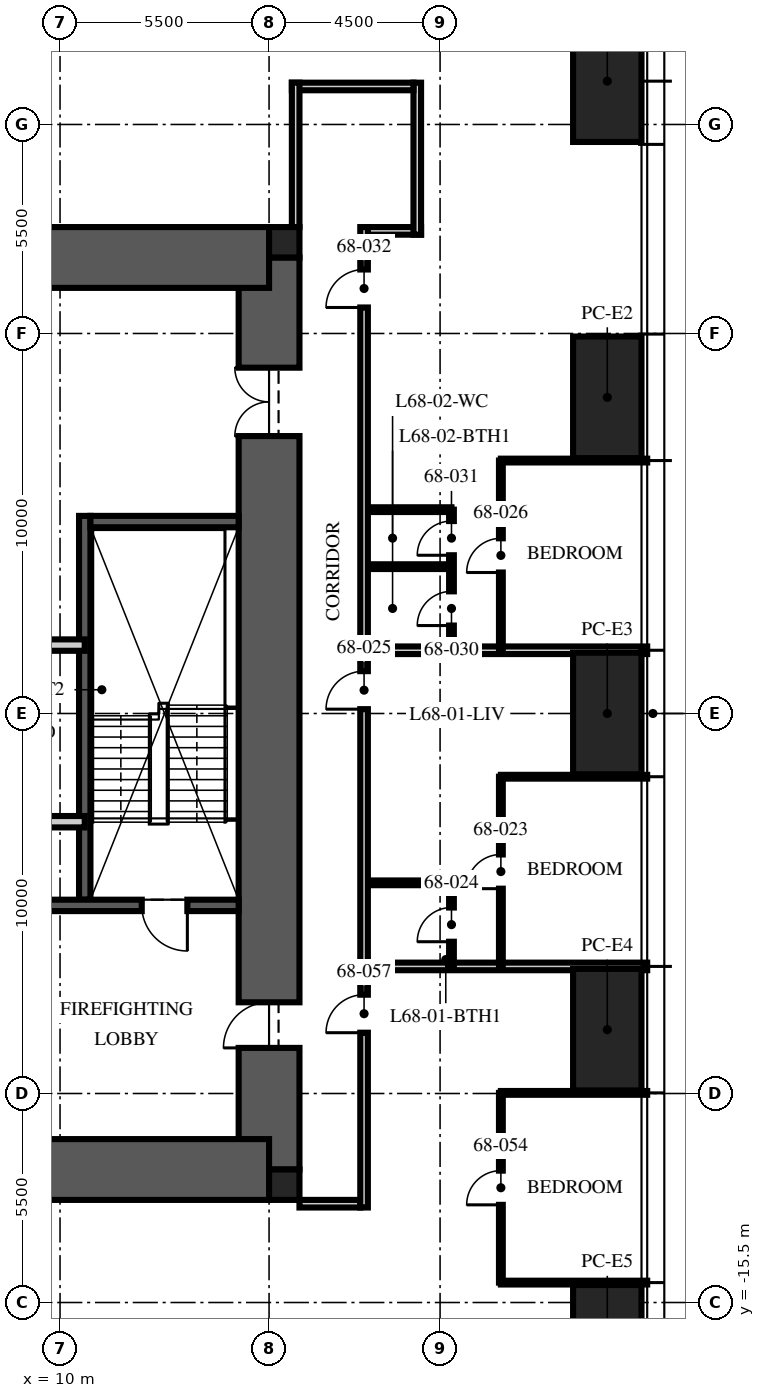
"""IFC4 building model, lengths in metres.
Left out: names, types, materials, properties, quantities, classifications, styles, units other than length and angle.
Written with IfcOpenShell. Run it as: python <this file> out.ifc"""

import sys

from ifc_helpers import new_model, si_unit, direction, frame, frame_2d, origin, origin_2d, place, context, subcontext, project, spatial, rectangle, hollow_rectangle, extrude, element, fill, save


model = new_model("IFC4")
c1 = context("Model", 3, precision=1e-05, world=origin(), true_north=direction((0.0, 1.0)))
c2 = subcontext(c1, "Body", "Model", "MODEL_VIEW")
j1 = project(units=[si_unit("LENGTHUNIT", "METRE"), si_unit("PLANEANGLEUNIT", "RADIAN")], contexts=[c1])
p1 = place(None, origin())
s1 = spatial("IfcSite", under=j1, at=p1, CompositionType="ELEMENT")
p2 = place(p1, origin())
s2 = spatial("IfcBuilding", under=s1, at=p2, CompositionType="ELEMENT")
p3 = place(p2, frame((0.0, 0.0, 270.75)))
s3 = spatial("IfcBuildingStorey", under=s2, at=p3, CompositionType="ELEMENT", Elevation=270.75)
p4 = place(p3, frame((15.5, -12.0, -0.25), z_axis=(0.0, 0.0, 1.0), x_axis=(0.0, 1.0, 0.0)))
e1 = element("IfcWall", 1, at=p4, inside=s3, PredefinedType="SHEAR", context=c2, shape_type="SweptSolid", body=[
    extrude(rectangle(XDim=24.0, YDim=1.6, at=frame_2d((12.0, 0.0))), origin(), (0.0, 0.0, 1.0), 3.75),
])
p5 = place(p4, frame((3.2, 0.0, 0.25)))
e2 = element("IfcOpeningElement", 2, at=p5, cuts=e1, PredefinedType="OPENING", context=c2, shape_type="SweptSolid", body=[
    extrude(rectangle(XDim=1.2, YDim=2.1, at=frame_2d((0.6, 1.05))), frame((0.0, 0.81, 0.0), z_axis=(0.0, -1.0, 0.0), x_axis=(1.0, 0.0, 0.0)), (0.0, 0.0, 1.0), 1.62),
])
p6 = place(p4, frame((19.3, 0.0, 0.25)))
e3 = element("IfcOpeningElement", 3, at=p6, cuts=e1, PredefinedType="OPENING", context=c2, shape_type="SweptSolid", body=[
    extrude(rectangle(XDim=1.8, YDim=2.1, at=frame_2d((0.9, 1.05))), frame((0.0, 0.81, 0.0), z_axis=(0.0, -1.0, 0.0), x_axis=(1.0, 0.0, 0.0)), (0.0, 0.0, 1.0), 1.62),
])
for number, where, z_axis, x_axis in (
    (4, (-15.5, 12.0, -0.25), (0.0, 0.0, 1.0), (1.0, 0.0, 0.0)),
    (5, (-15.5, -12.0, -0.25), (0.0, 0.0, 1.0), (1.0, 0.0, 0.0)),
):
    element("IfcWall", number, at=place(p3, frame(where, z_axis=z_axis, x_axis=x_axis)), inside=s3, PredefinedType="SHEAR", context=c2, shape_type="SweptSolid", body=[
        extrude(rectangle(XDim=31.0, YDim=1.6, at=frame_2d((15.5, 0.0))), origin(), (0.0, 0.0, 1.0), 3.75),
    ])
for number, where, z_axis, x_axis in (
    (6, (15.9, 12.4, -0.25), (0.0, 0.0, 1.0), (1.0, 0.0, 0.0)),
    (7, (15.9, -12.4, -0.25), (0.0, 0.0, 1.0), (1.0, 0.0, 0.0)),
):
    element("IfcColumn", number, at=place(p3, frame(where, z_axis=z_axis, x_axis=x_axis)), inside=s3, PredefinedType="COLUMN", context=c2, shape_type="SweptSolid", body=[
        extrude(rectangle(XDim=0.8, YDim=0.8, at=origin_2d()), origin(), (0.0, 0.0, 1.0), 3.75),
    ])
for number, where, z_axis, x_axis in (
    (8, (24.4, 16.64, 0.0), (0.0, 0.0, 1.0), (0.0, 1.0, 0.0)),
    (9, (24.4, 8.32, 0.0), (0.0, 0.0, 1.0), (0.0, 1.0, 0.0)),
    (10, (24.4, 0.0, 0.0), (0.0, 0.0, 1.0), (0.0, 1.0, 0.0)),
    (11, (24.4, -8.32, 0.0), (0.0, 0.0, 1.0), (0.0, 1.0, 0.0)),
    (12, (24.4, -16.64, 0.0), (0.0, 0.0, 1.0), (0.0, 1.0, 0.0)),
):
    element("IfcColumn", number, at=place(p3, frame(where, z_axis=z_axis, x_axis=x_axis)), inside=s3, PredefinedType="COLUMN", context=c2, shape_type="SweptSolid", body=[
        extrude(hollow_rectangle(XDim=3.2, YDim=1.8, WallThickness=0.14, at=origin_2d()), origin(), (0.0, 0.0, 1.0), 3.75),
    ])
p7 = place(p3, frame((10.65, -4.9, 0.0), z_axis=(0.0, 0.0, 1.0), x_axis=(0.0, 1.0, 0.0)))
e13 = element("IfcWall", 13, at=p7, inside=s3, PredefinedType="SOLIDWALL", context=c2, shape_type="SweptSolid", body=[
    extrude(rectangle(XDim=10.1, YDim=0.3, at=frame_2d((5.05, 0.0))), origin(), (0.0, 0.0, 1.0), 3.5),
])
p8 = place(p3, frame((14.7, -5.05, 0.0), z_axis=(0.0, 0.0, 1.0), x_axis=(-1.0, 0.0, 0.0)))
e14 = element("IfcWall", 14, at=p8, inside=s3, PredefinedType="SOLIDWALL", context=c2, shape_type="SweptSolid", body=[
    extrude(rectangle(XDim=5.9, YDim=0.3, at=frame_2d((2.95, 0.0))), origin(), (0.0, 0.0, 1.0), 3.5),
])
p9 = place(p8, frame((1.35, 0.0, 0.0)))
e15 = element("IfcOpeningElement", 15, at=p9, cuts=e14, PredefinedType="OPENING", context=c2, shape_type="SweptSolid", body=[
    extrude(rectangle(XDim=1.2, YDim=2.1, at=frame_2d((0.6, 1.05))), frame((0.0, 0.16, 0.0), z_axis=(0.0, -1.0, 0.0), x_axis=(1.0, 0.0, 0.0)), (0.0, 0.0, 1.0), 0.32),
])
p10 = place(p3, frame((14.7, 5.05, 0.0), z_axis=(0.0, 0.0, 1.0), x_axis=(-1.0, 0.0, 0.0)))
e16 = element("IfcWall", 16, at=p10, inside=s3, PredefinedType="SOLIDWALL", context=c2, shape_type="SweptSolid", body=[
    extrude(rectangle(XDim=3.9, YDim=0.3, at=frame_2d((1.95, 0.0))), origin(), (0.0, 0.0, 1.0), 3.5),
])
p11 = place(p3, frame((-10.65, 1.8, 0.0), z_axis=(0.0, 0.0, 1.0), x_axis=(1.0, 0.0, 0.0)))
e17 = element("IfcWall", 17, at=p11, inside=s3, PredefinedType="PARTITIONING", context=c2, shape_type="SweptSolid", body=[
    extrude(rectangle(XDim=21.3, YDim=0.3, at=frame_2d((10.65, 0.0))), origin(), (0.0, 0.0, 1.0), 3.5),
])
p12 = place(p11, frame((10.05, 0.0, 0.0)))
e18 = element("IfcOpeningElement", 18, at=p12, cuts=e17, PredefinedType="OPENING", context=c2, shape_type="SweptSolid", body=[
    extrude(rectangle(XDim=1.2, YDim=2.1, at=frame_2d((0.6, 1.05))), frame((0.0, 0.16, 0.0), z_axis=(0.0, -1.0, 0.0), x_axis=(1.0, 0.0, 0.0)), (0.0, 0.0, 1.0), 0.32),
])
p13 = place(p11, frame((19.238, 0.0, 0.0)))
e19 = element("IfcOpeningElement", 19, at=p13, cuts=e17, PredefinedType="OPENING", context=c2, shape_type="SweptSolid", body=[
    extrude(rectangle(XDim=0.9, YDim=2.1, at=frame_2d((0.45, 1.05))), frame((0.0, 0.16, 0.0), z_axis=(0.0, -1.0, 0.0), x_axis=(1.0, 0.0, 0.0)), (0.0, 0.0, 1.0), 0.32),
])
p14 = place(p3, frame((10.65, -2.848, 0.0), z_axis=(0.0, 0.0, 1.0), x_axis=(-1.0, 0.0, 0.0)))
e20 = element("IfcWall", 20, at=p14, inside=s3, PredefinedType="PARTITIONING", context=c2, shape_type="SweptSolid", body=[
    extrude(rectangle(XDim=6.45, YDim=0.3, at=frame_2d((3.225, 0.0))), origin(), (0.0, 0.0, 1.0), 3.5),
])
p15 = place(p3, frame((18.1, 12.7, 0.0), z_axis=(0.0, 0.0, 1.0), x_axis=(1.0, 0.0, 0.0)))
e21 = element("IfcWall", 21, at=p15, inside=s3, PredefinedType="PARTITIONING", context=c2, shape_type="SweptSolid", body=[
    extrude(rectangle(XDim=1.4, YDim=0.2, at=frame_2d((0.7, 0.0))), origin(), (0.0, 0.0, 1.0), 2.71),
])
p16 = place(p3, frame((19.4, 12.6, 0.0), z_axis=(0.0, 0.0, 1.0), x_axis=(0.0, 1.0, 0.0)))
e22 = element("IfcWall", 22, at=p16, inside=s3, PredefinedType="PARTITIONING", context=c2, shape_type="SweptSolid", body=[
    extrude(rectangle(XDim=4.0, YDim=0.2, at=frame_2d((2.0, 0.0))), origin(), (0.0, 0.0, 1.0), 2.6),
])
p17 = place(p3, frame((19.3, 16.5, 0.0), z_axis=(0.0, 0.0, 1.0), x_axis=(-1.0, 0.0, 0.0)))
e23 = element("IfcWall", 23, at=p17, inside=s3, PredefinedType="PARTITIONING", context=c2, shape_type="SweptSolid", body=[
    extrude(rectangle(XDim=3.2, YDim=0.2, at=frame_2d((1.6, 0.0))), origin(), (0.0, 0.0, 1.0), 2.3),
])
p18 = place(p3, frame((16.2, 16.6, 0.0), z_axis=(0.0, 0.0, 1.0), x_axis=(0.0, -1.0, 0.0)))
e24 = element("IfcWall", 24, at=p18, inside=s3, PredefinedType="PARTITIONING", context=c2, shape_type="SweptSolid", body=[
    extrude(rectangle(XDim=3.8, YDim=0.2, at=frame_2d((1.9, 0.0))), origin(), (0.0, 0.0, 1.0), 2.3),
])
p19 = place(p3, frame((16.3, -12.9, 0.0), z_axis=(0.0, 0.0, 1.0), x_axis=(1.0, 0.0, 0.0)))
e25 = element("IfcWall", 25, at=p19, inside=s3, PredefinedType="PARTITIONING", context=c2, shape_type="SweptSolid", body=[
    extrude(rectangle(XDim=1.6, YDim=0.2, at=frame_2d((0.8, 0.0))), origin(), (0.0, 0.0, 1.0), 2.3),
])
p20 = place(p3, frame((18.1, -6.656, 0.0), z_axis=(0.0, 0.0, 1.0), x_axis=(1.0, 0.0, 0.0)))
e26 = element("IfcWall", 26, at=p20, inside=s3, PredefinedType="PARTITIONING", context=c2, shape_type="SweptSolid", body=[
    extrude(rectangle(XDim=7.35, YDim=0.2, at=frame_2d((3.675, 0.0))), origin(), (0.0, 0.0, 1.0), 2.81),
])
p21 = place(p3, frame((21.6, -1.664, 0.0), z_axis=(0.0, 0.0, 1.0), x_axis=(1.0, 0.0, 0.0)))
e27 = element("IfcWall", 27, at=p21, inside=s3, PredefinedType="PARTITIONING", context=c2, shape_type="SweptSolid", body=[
    extrude(rectangle(XDim=3.85, YDim=0.1, at=frame_2d((1.925, 0.0))), origin(), (0.0, 0.0, 1.0), 2.81),
])
p22 = place(p3, frame((18.1, 1.664, 0.0), z_axis=(0.0, 0.0, 1.0), x_axis=(1.0, 0.0, 0.0)))
e28 = element("IfcWall", 28, at=p22, inside=s3, PredefinedType="PARTITIONING", context=c2, shape_type="SweptSolid", body=[
    extrude(rectangle(XDim=7.35, YDim=0.2, at=frame_2d((3.675, 0.0))), origin(), (0.0, 0.0, 1.0), 2.81),
])
for number, where, z_axis, x_axis in (
    (29, (21.6, 6.656, 0.0), (0.0, 0.0, 1.0), (1.0, 0.0, 0.0)),
    (30, (21.6, -14.976, 0.0), (0.0, 0.0, 1.0), (1.0, 0.0, 0.0)),
    (31, (21.6, -9.984, 0.0), (0.0, 0.0, 1.0), (1.0, 0.0, 0.0)),
):
    element("IfcWall", number, at=place(p3, frame(where, z_axis=z_axis, x_axis=x_axis)), inside=s3, PredefinedType="PARTITIONING", context=c2, shape_type="SweptSolid", body=[
        extrude(rectangle(XDim=3.85, YDim=0.1, at=frame_2d((1.925, 0.0))), origin(), (0.0, 0.0, 1.0), 2.81),
    ])
p23 = place(p3, frame((21.6, -6.656, 0.0), z_axis=(0.0, 0.0, 1.0), x_axis=(0.0, 1.0, 0.0)))
e32 = element("IfcWall", 32, at=p23, inside=s3, PredefinedType="PARTITIONING", context=c2, shape_type="SweptSolid", body=[
    extrude(rectangle(XDim=4.992, YDim=0.1, at=frame_2d((2.496, 0.0))), origin(), (0.0, 0.0, 1.0), 2.71),
])
p24 = place(p23, frame((2.046, 0.0, 0.0)))
e33 = element("IfcOpeningElement", 33, at=p24, cuts=e32, PredefinedType="OPENING", context=c2, shape_type="SweptSolid", body=[
    extrude(rectangle(XDim=0.9, YDim=2.1, at=frame_2d((0.45, 1.05))), frame((0.0, 0.06, 0.0), z_axis=(0.0, -1.0, 0.0), x_axis=(1.0, 0.0, 0.0)), (0.0, 0.0, 1.0), 0.12),
])
p25 = place(p3, frame((20.3, -6.656, 0.0), z_axis=(0.0, 0.0, 1.0), x_axis=(0.0, 1.0, 0.0)))
e34 = element("IfcWall", 34, at=p25, inside=s3, PredefinedType="PARTITIONING", context=c2, shape_type="SweptSolid", body=[
    extrude(rectangle(XDim=2.2, YDim=0.125, at=frame_2d((1.1, 0.0))), origin(), (0.0, 0.0, 1.0), 3.5),
])
p26 = place(p25, frame((0.65, 0.0, 0.0)))
e35 = element("IfcOpeningElement", 35, at=p26, cuts=e34, PredefinedType="OPENING", context=c2, shape_type="SweptSolid", body=[
    extrude(rectangle(XDim=0.9, YDim=2.1, at=frame_2d((0.45, 1.05))), frame((0.0, 0.073, 0.0), z_axis=(0.0, -1.0, 0.0), x_axis=(1.0, 0.0, 0.0)), (0.0, 0.0, 1.0), 0.145),
])
p27 = place(p3, frame((18.1, -4.456, 0.0), z_axis=(0.0, 0.0, 1.0), x_axis=(1.0, 0.0, 0.0)))
e36 = element("IfcWall", 36, at=p27, inside=s3, PredefinedType="PARTITIONING", context=c2, shape_type="SweptSolid", body=[
    extrude(rectangle(XDim=2.2, YDim=0.125, at=frame_2d((1.1, 0.0))), origin(), (0.0, 0.0, 1.0), 3.5),
])
p28 = place(p3, frame((21.6, 1.664, 0.0), z_axis=(0.0, 0.0, 1.0), x_axis=(0.0, 1.0, 0.0)))
e37 = element("IfcWall", 37, at=p28, inside=s3, PredefinedType="PARTITIONING", context=c2, shape_type="SweptSolid", body=[
    extrude(rectangle(XDim=4.992, YDim=0.1, at=frame_2d((2.496, 0.0))), origin(), (0.0, 0.0, 1.0), 2.71),
])
p29 = place(p28, frame((2.046, 0.0, 0.0)))
e38 = element("IfcOpeningElement", 38, at=p29, cuts=e37, PredefinedType="OPENING", context=c2, shape_type="SweptSolid", body=[
    extrude(rectangle(XDim=0.9, YDim=2.1, at=frame_2d((0.45, 1.05))), frame((0.0, 0.06, 0.0), z_axis=(0.0, -1.0, 0.0), x_axis=(1.0, 0.0, 0.0)), (0.0, 0.0, 1.0), 0.12),
])
p30 = place(p3, frame((20.3, 1.664, 0.0), z_axis=(0.0, 0.0, 1.0), x_axis=(0.0, 1.0, 0.0)))
e39 = element("IfcWall", 39, at=p30, inside=s3, PredefinedType="PARTITIONING", context=c2, shape_type="SweptSolid", body=[
    extrude(rectangle(XDim=3.7, YDim=0.125, at=frame_2d((1.85, 0.0))), origin(), (0.0, 0.0, 1.0), 2.71),
])
p31 = place(p30, frame((0.65, 0.0, 0.0)))
e40 = element("IfcOpeningElement", 40, at=p31, cuts=e39, PredefinedType="OPENING", context=c2, shape_type="SweptSolid", body=[
    extrude(rectangle(XDim=0.9, YDim=2.1, at=frame_2d((0.45, 1.05))), frame((0.0, 0.073, 0.0), z_axis=(0.0, -1.0, 0.0), x_axis=(1.0, 0.0, 0.0)), (0.0, 0.0, 1.0), 0.145),
])
p32 = place(p30, frame((2.5, 0.0, 0.0)))
e41 = element("IfcOpeningElement", 41, at=p32, cuts=e39, PredefinedType="OPENING", context=c2, shape_type="SweptSolid", body=[
    extrude(rectangle(XDim=0.9, YDim=2.1, at=frame_2d((0.45, 1.05))), frame((0.0, 0.073, 0.0), z_axis=(0.0, -1.0, 0.0), x_axis=(1.0, 0.0, 0.0)), (0.0, 0.0, 1.0), 0.145),
])
for number, where, z_axis, x_axis in (
    (42, (18.1, 3.864, 0.0), (0.0, 0.0, 1.0), (1.0, 0.0, 0.0)),
    (43, (18.1, 5.364, 0.0), (0.0, 0.0, 1.0), (1.0, 0.0, 0.0)),
):
    element("IfcWall", number, at=place(p3, frame(where, z_axis=z_axis, x_axis=x_axis)), inside=s3, PredefinedType="PARTITIONING", context=c2, shape_type="SweptSolid", body=[
        extrude(rectangle(XDim=2.2, YDim=0.125, at=frame_2d((1.1, 0.0))), origin(), (0.0, 0.0, 1.0), 3.5),
    ])
p33 = place(p3, frame((21.6, -14.976, 0.0), z_axis=(0.0, 0.0, 1.0), x_axis=(0.0, 1.0, 0.0)))
e44 = element("IfcWall", 44, at=p33, inside=s3, PredefinedType="PARTITIONING", context=c2, shape_type="SweptSolid", body=[
    extrude(rectangle(XDim=4.992, YDim=0.1, at=frame_2d((2.496, 0.0))), origin(), (0.0, 0.0, 1.0), 2.71),
])
p34 = place(p33, frame((2.046, 0.0, 0.0)))
e45 = element("IfcOpeningElement", 45, at=p34, cuts=e44, PredefinedType="OPENING", context=c2, shape_type="SweptSolid", body=[
    extrude(rectangle(XDim=0.9, YDim=2.1, at=frame_2d((0.45, 1.05))), frame((0.0, 0.06, 0.0), z_axis=(0.0, -1.0, 0.0), x_axis=(1.0, 0.0, 0.0)), (0.0, 0.0, 1.0), 0.12),
])
p35 = place(p3, frame((18.0, -13.0, 0.0), z_axis=(0.0, 0.0, 1.0), x_axis=(0.0, 1.0, 0.0)))
e46 = element("IfcWall", 46, at=p35, inside=s3, PredefinedType="PARTITIONING", context=c2, shape_type="SweptSolid", body=[
    extrude(rectangle(XDim=25.8, YDim=0.2, at=frame_2d((12.9, 0.0))), origin(), (0.0, 0.0, 1.0), 2.6),
])
p36 = place(p35, frame((13.114, 0.0, 0.0)))
e47 = element("IfcOpeningElement", 47, at=p36, cuts=e46, PredefinedType="OPENING", context=c2, shape_type="SweptSolid", body=[
    extrude(rectangle(XDim=1.0, YDim=2.2, at=frame_2d((0.5, 1.1))), frame((0.0, 0.11, 0.0), z_axis=(0.0, -1.0, 0.0), x_axis=(1.0, 0.0, 0.0)), (0.0, 0.0, 1.0), 0.22),
])
p37 = place(p35, frame((23.684, 0.0, 0.0)))
e48 = element("IfcOpeningElement", 48, at=p37, cuts=e46, PredefinedType="OPENING", context=c2, shape_type="SweptSolid", body=[
    extrude(rectangle(XDim=1.0, YDim=2.2, at=frame_2d((0.5, 1.1))), frame((0.0, 0.11, 0.0), z_axis=(0.0, -1.0, 0.0), x_axis=(1.0, 0.0, 0.0)), (0.0, 0.0, 1.0), 0.22),
])
p38 = place(p35, frame((4.6, 0.0, 0.0)))
e49 = element("IfcOpeningElement", 49, at=p38, cuts=e46, PredefinedType="OPENING", context=c2, shape_type="SweptSolid", body=[
    extrude(rectangle(XDim=1.0, YDim=2.2, at=frame_2d((0.5, 1.1))), frame((0.0, 0.11, 0.0), z_axis=(0.0, -1.0, 0.0), x_axis=(1.0, 0.0, 0.0)), (0.0, 0.0, 1.0), 0.22),
])
p39 = place(p9, origin())
e50 = element("IfcDoor", 50, at=p39, inside=s3, OperationType="SINGLE_SWING_LEFT", PredefinedType="DOOR", context=c2, shape_type="SweptSolid", body=[
    extrude(rectangle(XDim=1.2, YDim=2.1, at=frame_2d((0.6, 1.05))), frame((0.0, 0.025, 0.0), z_axis=(0.0, -1.0, 0.0), x_axis=(1.0, 0.0, 0.0)), (0.0, 0.0, 1.0), 0.05),
])
fill(e15, e50)
p40 = place(p5, origin())
e51 = element("IfcDoor", 51, at=p40, inside=s3, OperationType="SINGLE_SWING_LEFT", PredefinedType="DOOR", context=c2, shape_type="SweptSolid", body=[
    extrude(rectangle(XDim=1.2, YDim=2.1, at=frame_2d((0.6, 1.05))), frame((0.0, 0.025, 0.0), z_axis=(0.0, -1.0, 0.0), x_axis=(1.0, 0.0, 0.0)), (0.0, 0.0, 1.0), 0.05),
])
fill(e2, e51)
p41 = place(p6, origin())
e52 = element("IfcDoor", 52, at=p41, inside=s3, OperationType="DOUBLE_DOOR_SINGLE_SWING", PredefinedType="DOOR", context=c2, shape_type="SweptSolid", body=[
    extrude(rectangle(XDim=1.8, YDim=2.1, at=frame_2d((0.9, 1.05))), frame((0.0, 0.025, 0.0), z_axis=(0.0, -1.0, 0.0), x_axis=(1.0, 0.0, 0.0)), (0.0, 0.0, 1.0), 0.05),
])
fill(e3, e52)
p42 = place(p24, origin())
e53 = element("IfcDoor", 53, at=p42, inside=s3, OperationType="SINGLE_SWING_LEFT", PredefinedType="DOOR", context=c2, shape_type="SweptSolid", body=[
    extrude(rectangle(XDim=0.9, YDim=2.1, at=frame_2d((0.45, 1.05))), frame((0.0, 0.025, 0.0), z_axis=(0.0, -1.0, 0.0), x_axis=(1.0, 0.0, 0.0)), (0.0, 0.0, 1.0), 0.05),
])
fill(e33, e53)
p43 = place(p26, origin())
e54 = element("IfcDoor", 54, at=p43, inside=s3, OperationType="SINGLE_SWING_LEFT", PredefinedType="DOOR", context=c2, shape_type="SweptSolid", body=[
    extrude(rectangle(XDim=0.9, YDim=2.1, at=frame_2d((0.45, 1.05))), frame((0.0, 0.025, 0.0), z_axis=(0.0, -1.0, 0.0), x_axis=(1.0, 0.0, 0.0)), (0.0, 0.0, 1.0), 0.05),
])
fill(e35, e54)
p44 = place(p36, origin())
e55 = element("IfcDoor", 55, at=p44, inside=s3, OperationType="SINGLE_SWING_LEFT", PredefinedType="DOOR", context=c2, shape_type="SweptSolid", body=[
    extrude(rectangle(XDim=1.0, YDim=2.2, at=frame_2d((0.5, 1.1))), frame((0.0, 0.025, 0.0), z_axis=(0.0, -1.0, 0.0), x_axis=(1.0, 0.0, 0.0)), (0.0, 0.0, 1.0), 0.05),
])
fill(e47, e55)
p45 = place(p29, origin())
e56 = element("IfcDoor", 56, at=p45, inside=s3, OperationType="SINGLE_SWING_LEFT", PredefinedType="DOOR", context=c2, shape_type="SweptSolid", body=[
    extrude(rectangle(XDim=0.9, YDim=2.1, at=frame_2d((0.45, 1.05))), frame((0.0, 0.025, 0.0), z_axis=(0.0, -1.0, 0.0), x_axis=(1.0, 0.0, 0.0)), (0.0, 0.0, 1.0), 0.05),
])
fill(e38, e56)
p46 = place(p31, origin())
e57 = element("IfcDoor", 57, at=p46, inside=s3, OperationType="SINGLE_SWING_LEFT", PredefinedType="DOOR", context=c2, shape_type="SweptSolid", body=[
    extrude(rectangle(XDim=0.9, YDim=2.1, at=frame_2d((0.45, 1.05))), frame((0.0, 0.025, 0.0), z_axis=(0.0, -1.0, 0.0), x_axis=(1.0, 0.0, 0.0)), (0.0, 0.0, 1.0), 0.05),
])
fill(e40, e57)
p47 = place(p32, origin())
e58 = element("IfcDoor", 58, at=p47, inside=s3, OperationType="SINGLE_SWING_LEFT", PredefinedType="DOOR", context=c2, shape_type="SweptSolid", body=[
    extrude(rectangle(XDim=0.9, YDim=2.1, at=frame_2d((0.45, 1.05))), frame((0.0, 0.025, 0.0), z_axis=(0.0, -1.0, 0.0), x_axis=(1.0, 0.0, 0.0)), (0.0, 0.0, 1.0), 0.05),
])
fill(e41, e58)
p48 = place(p37, origin())
e59 = element("IfcDoor", 59, at=p48, inside=s3, OperationType="SINGLE_SWING_LEFT", PredefinedType="DOOR", context=c2, shape_type="SweptSolid", body=[
    extrude(rectangle(XDim=1.0, YDim=2.2, at=frame_2d((0.5, 1.1))), frame((0.0, 0.025, 0.0), z_axis=(0.0, -1.0, 0.0), x_axis=(1.0, 0.0, 0.0)), (0.0, 0.0, 1.0), 0.05),
])
fill(e48, e59)
p49 = place(p34, origin())
e60 = element("IfcDoor", 60, at=p49, inside=s3, OperationType="SINGLE_SWING_LEFT", PredefinedType="DOOR", context=c2, shape_type="SweptSolid", body=[
    extrude(rectangle(XDim=0.9, YDim=2.1, at=frame_2d((0.45, 1.05))), frame((0.0, 0.025, 0.0), z_axis=(0.0, -1.0, 0.0), x_axis=(1.0, 0.0, 0.0)), (0.0, 0.0, 1.0), 0.05),
])
fill(e45, e60)
p50 = place(p38, origin())
e61 = element("IfcDoor", 61, at=p50, inside=s3, OperationType="SINGLE_SWING_LEFT", PredefinedType="DOOR", context=c2, shape_type="SweptSolid", body=[
    extrude(rectangle(XDim=1.0, YDim=2.2, at=frame_2d((0.5, 1.1))), frame((0.0, 0.025, 0.0), z_axis=(0.0, -1.0, 0.0), x_axis=(1.0, 0.0, 0.0)), (0.0, 0.0, 1.0), 0.05),
])
fill(e49, e61)
save(model, sys.argv[1])
